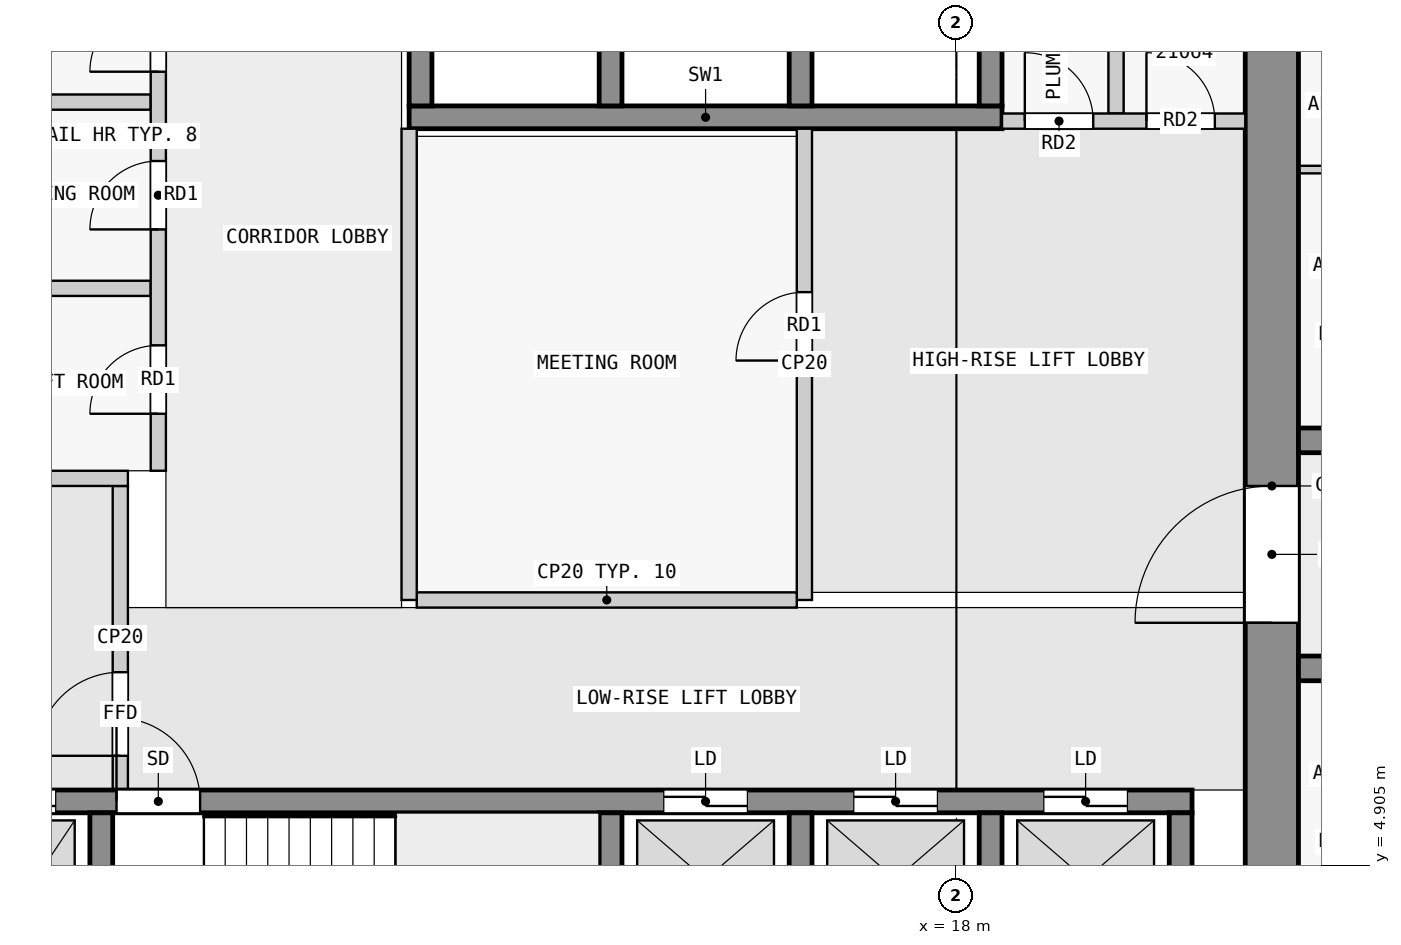
"""IFC4 building model, lengths in metres.
Left out: names, types, materials, properties, quantities, classifications, styles, units other than length and angle.
Written with IfcOpenShell. Run it as: python <this file> out.ifc"""

import sys

from ifc_helpers import new_model, si_unit, direction, frame, frame_2d, origin, place, context, subcontext, project, spatial, rectangle, extrude, element, fill, save


model = new_model("IFC4")
c1 = context("Model", 3, precision=1e-05, world=origin(), true_north=direction((0.0, 1.0)))
c2 = subcontext(c1, "Body", "Model", "MODEL_VIEW")
j1 = project(units=[si_unit("LENGTHUNIT", "METRE"), si_unit("PLANEANGLEUNIT", "RADIAN")], contexts=[c1])
p1 = place(None, origin())
s1 = spatial("IfcSite", under=j1, at=p1, CompositionType="ELEMENT")
p2 = place(p1, origin())
s2 = spatial("IfcBuilding", under=s1, at=p2, CompositionType="ELEMENT")
p3 = place(p2, frame((0.0, 0.0, 85.3)))
s3 = spatial("IfcBuildingStorey", under=s2, at=p3, CompositionType="ELEMENT", Elevation=85.3)
p4 = place(p3, frame((22.15, 2.5, 0.0), z_axis=(0.0, 0.0, 1.0), x_axis=(0.0, 1.0, 0.0)))
e1 = element("IfcWall", 1, at=p4, inside=s3, PredefinedType="SHEAR", context=c2, shape_type="SweptSolid", body=[
    extrude(rectangle(XDim=14.8, YDim=0.7, at=frame_2d((7.4, 0.0))), origin(), (0.0, 0.0, 1.0), 3.25),
])
p5 = place(p4, frame((5.6, 0.0, 0.0)))
e2 = element("IfcOpeningElement", 2, at=p5, cuts=e1, PredefinedType="OPENING", context=c2, shape_type="SweptSolid", body=[
    extrude(rectangle(XDim=1.8, YDim=2.1, at=frame_2d((0.9, 1.05))), frame((0.0, 0.36, 0.0), z_axis=(0.0, -1.0, 0.0), x_axis=(1.0, 0.0, 0.0)), (0.0, 0.0, 1.0), 0.72),
])
for number, where, z_axis, x_axis in (
    (3, (6.75, 2.8, 0.0), (0.0, 0.0, 1.0), (0.0, 1.0, 0.0)),
    (4, (13.45, 2.8, 0.0), (0.0, 0.0, 1.0), (0.0, 1.0, 0.0)),
    (5, (15.95, 2.8, 0.0), (0.0, 0.0, 1.0), (0.0, 1.0, 0.0)),
    (6, (18.45, 2.8, 0.0), (0.0, 0.0, 1.0), (0.0, 1.0, 0.0)),
    (7, (20.95, 2.8, 0.0), (0.0, 0.0, 1.0), (0.0, 1.0, 0.0)),
):
    element("IfcWall", number, at=place(p3, frame(where, z_axis=z_axis, x_axis=x_axis)), inside=s3, PredefinedType="SHEAR", context=c2, shape_type="SweptSolid", body=[
        extrude(rectangle(XDim=2.8, YDim=0.3, at=frame_2d((1.4, 0.0))), origin(), (0.0, 0.0, 1.0), 3.25),
    ])
p6 = place(p3, frame((2.3, 5.75, 0.0), z_axis=(0.0, 0.0, 1.0), x_axis=(1.0, 0.0, 0.0)))
e8 = element("IfcWall", 8, at=p6, inside=s3, PredefinedType="SHEAR", context=c2, shape_type="SweptSolid", body=[
    extrude(rectangle(XDim=18.8, YDim=0.3, at=frame_2d((9.4, 0.0))), origin(), (0.0, 0.0, 1.0), 3.25),
])
p7 = place(p6, frame((4.65, 0.0, 0.0)))
e9 = element("IfcOpeningElement", 9, at=p7, cuts=e8, PredefinedType="OPENING", context=c2, shape_type="SweptSolid", body=[
    extrude(rectangle(XDim=1.1, YDim=2.1, at=frame_2d((0.55, 1.05))), frame((0.0, 0.16, 0.0), z_axis=(0.0, -1.0, 0.0), x_axis=(1.0, 0.0, 0.0)), (0.0, 0.0, 1.0), 0.32),
])
p8 = place(p6, frame((0.45, 0.0, 0.0)))
e10 = element("IfcOpeningElement", 10, at=p8, cuts=e8, PredefinedType="OPENING", context=c2, shape_type="SweptSolid", body=[
    extrude(rectangle(XDim=1.1, YDim=2.1, at=frame_2d((0.55, 1.05))), frame((0.0, 0.16, 0.0), z_axis=(0.0, -1.0, 0.0), x_axis=(1.0, 0.0, 0.0)), (0.0, 0.0, 1.0), 0.32),
])
p9 = place(p6, frame((2.75, 0.0, 0.0)))
e11 = element("IfcOpeningElement", 11, at=p9, cuts=e8, PredefinedType="OPENING", context=c2, shape_type="SweptSolid", body=[
    extrude(rectangle(XDim=1.1, YDim=2.1, at=frame_2d((0.55, 1.05))), frame((0.0, 0.16, 0.0), z_axis=(0.0, -1.0, 0.0), x_axis=(1.0, 0.0, 0.0)), (0.0, 0.0, 1.0), 0.32),
])
p10 = place(p6, frame((11.85, 0.0, 0.0)))
e12 = element("IfcOpeningElement", 12, at=p10, cuts=e8, PredefinedType="OPENING", context=c2, shape_type="SweptSolid", body=[
    extrude(rectangle(XDim=1.1, YDim=2.1, at=frame_2d((0.55, 1.05))), frame((0.0, 0.16, 0.0), z_axis=(0.0, -1.0, 0.0), x_axis=(1.0, 0.0, 0.0)), (0.0, 0.0, 1.0), 0.32),
])
p11 = place(p6, frame((14.35, 0.0, 0.0)))
e13 = element("IfcOpeningElement", 13, at=p11, cuts=e8, PredefinedType="OPENING", context=c2, shape_type="SweptSolid", body=[
    extrude(rectangle(XDim=1.1, YDim=2.1, at=frame_2d((0.55, 1.05))), frame((0.0, 0.16, 0.0), z_axis=(0.0, -1.0, 0.0), x_axis=(1.0, 0.0, 0.0)), (0.0, 0.0, 1.0), 0.32),
])
p12 = place(p6, frame((16.85, 0.0, 0.0)))
e14 = element("IfcOpeningElement", 14, at=p12, cuts=e8, PredefinedType="OPENING", context=c2, shape_type="SweptSolid", body=[
    extrude(rectangle(XDim=1.1, YDim=2.1, at=frame_2d((0.55, 1.05))), frame((0.0, 0.16, 0.0), z_axis=(0.0, -1.0, 0.0), x_axis=(1.0, 0.0, 0.0)), (0.0, 0.0, 1.0), 0.32),
])
p13 = place(p3, frame((10.8, 14.75, 0.0), z_axis=(0.0, 0.0, 1.0), x_axis=(1.0, 0.0, 0.0)))
e15 = element("IfcWall", 15, at=p13, inside=s3, PredefinedType="SHEAR", context=c2, shape_type="SweptSolid", body=[
    extrude(rectangle(XDim=7.8, YDim=0.3, at=frame_2d((3.9, 0.0))), origin(), (0.0, 0.0, 1.0), 3.25),
])
for number, where, z_axis, x_axis in (
    (16, (10.95, 14.9, 0.0), (0.0, 0.0, 1.0), (0.0, 1.0, 0.0)),
    (17, (13.45, 14.9, 0.0), (0.0, 0.0, 1.0), (0.0, 1.0, 0.0)),
    (18, (15.95, 14.9, 0.0), (0.0, 0.0, 1.0), (0.0, 1.0, 0.0)),
    (19, (18.45, 14.9, 0.0), (0.0, 0.0, 1.0), (0.0, 1.0, 0.0)),
):
    element("IfcWall", number, at=place(p3, frame(where, z_axis=z_axis, x_axis=x_axis)), inside=s3, PredefinedType="SHEAR", context=c2, shape_type="SweptSolid", body=[
        extrude(rectangle(XDim=2.0, YDim=0.3, at=frame_2d((1.0, 0.0))), origin(), (0.0, 0.0, 1.0), 3.25),
    ])
p14 = place(p3, frame((22.5, 7.5, 0.0), z_axis=(0.0, 0.0, 1.0), x_axis=(1.0, 0.0, 0.0)))
e20 = element("IfcWall", 20, at=p14, inside=s3, PredefinedType="SHEAR", context=c2, shape_type="SweptSolid", body=[
    extrude(rectangle(XDim=22.5, YDim=0.325, at=frame_2d((11.25, 0.0))), origin(), (0.0, 0.0, 1.0), 3.25),
])
p15 = place(p14, frame((4.05, 0.0, 0.0)))
e21 = element("IfcOpeningElement", 21, at=p15, cuts=e20, PredefinedType="OPENING", context=c2, shape_type="SweptSolid", body=[
    extrude(rectangle(XDim=1.0, YDim=2.1, at=frame_2d((0.5, 1.05))), frame((0.0, 0.172, 0.0), z_axis=(0.0, -1.0, 0.0), x_axis=(1.0, 0.0, 0.0)), (0.0, 0.0, 1.0), 0.345),
])
p16 = place(p14, frame((13.05, 0.0, 0.0)))
e22 = element("IfcOpeningElement", 22, at=p16, cuts=e20, PredefinedType="OPENING", context=c2, shape_type="SweptSolid", body=[
    extrude(rectangle(XDim=1.0, YDim=2.1, at=frame_2d((0.5, 1.05))), frame((0.0, 0.172, 0.0), z_axis=(0.0, -1.0, 0.0), x_axis=(1.0, 0.0, 0.0)), (0.0, 0.0, 1.0), 0.345),
])
p17 = place(p14, frame((18.75, 0.0, 0.0)))
e23 = element("IfcOpeningElement", 23, at=p17, cuts=e20, PredefinedType="OPENING", context=c2, shape_type="SweptSolid", body=[
    extrude(rectangle(XDim=0.9, YDim=2.1, at=frame_2d((0.45, 1.05))), frame((0.0, 0.172, 0.0), z_axis=(0.0, -1.0, 0.0), x_axis=(1.0, 0.0, 0.0)), (0.0, 0.0, 1.0), 0.345),
])
p18 = place(p14, frame((20.95, 0.0, 0.0)))
e24 = element("IfcOpeningElement", 24, at=p18, cuts=e20, PredefinedType="OPENING", context=c2, shape_type="SweptSolid", body=[
    extrude(rectangle(XDim=1.0, YDim=2.1, at=frame_2d((0.5, 1.05))), frame((0.0, 0.172, 0.0), z_axis=(0.0, -1.0, 0.0), x_axis=(1.0, 0.0, 0.0)), (0.0, 0.0, 1.0), 0.345),
])
p19 = place(p3, frame((22.5, 10.5, 0.0), z_axis=(0.0, 0.0, 1.0), x_axis=(1.0, 0.0, 0.0)))
e25 = element("IfcWall", 25, at=p19, inside=s3, PredefinedType="SHEAR", context=c2, shape_type="SweptSolid", body=[
    extrude(rectangle(XDim=22.5, YDim=0.325, at=frame_2d((11.25, 0.0))), origin(), (0.0, 0.0, 1.0), 3.25),
])
p20 = place(p19, frame((4.05, 0.0, 0.0)))
e26 = element("IfcOpeningElement", 26, at=p20, cuts=e25, PredefinedType="OPENING", context=c2, shape_type="SweptSolid", body=[
    extrude(rectangle(XDim=1.0, YDim=2.1, at=frame_2d((0.5, 1.05))), frame((0.0, 0.172, 0.0), z_axis=(0.0, -1.0, 0.0), x_axis=(1.0, 0.0, 0.0)), (0.0, 0.0, 1.0), 0.345),
])
p21 = place(p19, frame((10.75, 0.0, 0.0)))
e27 = element("IfcOpeningElement", 27, at=p21, cuts=e25, PredefinedType="OPENING", context=c2, shape_type="SweptSolid", body=[
    extrude(rectangle(XDim=1.0, YDim=2.1, at=frame_2d((0.5, 1.05))), frame((0.0, 0.172, 0.0), z_axis=(0.0, -1.0, 0.0), x_axis=(1.0, 0.0, 0.0)), (0.0, 0.0, 1.0), 0.345),
])
p22 = place(p19, frame((16.85, 0.0, 0.0)))
e28 = element("IfcOpeningElement", 28, at=p22, cuts=e25, PredefinedType="OPENING", context=c2, shape_type="SweptSolid", body=[
    extrude(rectangle(XDim=1.0, YDim=2.1, at=frame_2d((0.5, 1.05))), frame((0.0, 0.172, 0.0), z_axis=(0.0, -1.0, 0.0), x_axis=(1.0, 0.0, 0.0)), (0.0, 0.0, 1.0), 0.345),
])
p23 = place(p3, frame((7.0, 5.9, 0.0), z_axis=(0.0, 0.0, 1.0), x_axis=(0.0, 1.0, 0.0)))
e29 = element("IfcWall", 29, at=p23, inside=s3, PredefinedType="PARTITIONING", context=c2, shape_type="SweptSolid", body=[
    extrude(rectangle(XDim=4.0, YDim=0.2, at=frame_2d((2.0, 0.0))), origin(), (0.0, 0.0, 1.0), 3.25),
])
p24 = place(p23, frame((0.45, 0.0, 0.0)))
e30 = element("IfcOpeningElement", 30, at=p24, cuts=e29, PredefinedType="OPENING", context=c2, shape_type="SweptSolid", body=[
    extrude(rectangle(XDim=1.1, YDim=2.1, at=frame_2d((0.55, 1.05))), frame((0.0, 0.11, 0.0), z_axis=(0.0, -1.0, 0.0), x_axis=(1.0, 0.0, 0.0)), (0.0, 0.0, 1.0), 0.22),
])
p25 = place(p3, frame((5.15, 10.0, 0.0), z_axis=(0.0, 0.0, 1.0), x_axis=(1.0, 0.0, 0.0)))
e31 = element("IfcWall", 31, at=p25, inside=s3, PredefinedType="PARTITIONING", context=c2, shape_type="SweptSolid", body=[
    extrude(rectangle(XDim=1.95, YDim=0.2, at=frame_2d((0.975, 0.0))), origin(), (0.0, 0.0, 1.0), 3.25),
])
p26 = place(p3, frame((10.8, 8.4, 0.0), z_axis=(0.0, 0.0, 1.0), x_axis=(0.0, 1.0, 0.0)))
e32 = element("IfcWall", 32, at=p26, inside=s3, PredefinedType="PARTITIONING", context=c2, shape_type="SweptSolid", body=[
    extrude(rectangle(XDim=6.2, YDim=0.2, at=frame_2d((3.1, 0.0))), origin(), (0.0, 0.0, 1.0), 3.25),
])
p27 = place(p3, frame((10.9, 8.4, 0.0), z_axis=(0.0, 0.0, 1.0), x_axis=(1.0, 0.0, 0.0)))
e33 = element("IfcWall", 33, at=p27, inside=s3, PredefinedType="PARTITIONING", context=c2, shape_type="SweptSolid", body=[
    extrude(rectangle(XDim=5.0, YDim=0.2, at=frame_2d((2.5, 0.0))), origin(), (0.0, 0.0, 1.0), 3.25),
])
p28 = place(p3, frame((16.0, 8.4, 0.0), z_axis=(0.0, 0.0, 1.0), x_axis=(0.0, 1.0, 0.0)))
e34 = element("IfcWall", 34, at=p28, inside=s3, PredefinedType="PARTITIONING", context=c2, shape_type="SweptSolid", body=[
    extrude(rectangle(XDim=6.2, YDim=0.2, at=frame_2d((3.1, 0.0))), origin(), (0.0, 0.0, 1.0), 3.25),
])
p29 = place(p28, frame((3.15, 0.0, 0.0)))
e35 = element("IfcOpeningElement", 35, at=p29, cuts=e34, PredefinedType="OPENING", context=c2, shape_type="SweptSolid", body=[
    extrude(rectangle(XDim=0.9, YDim=2.1, at=frame_2d((0.45, 1.05))), frame((0.0, 0.11, 0.0), z_axis=(0.0, -1.0, 0.0), x_axis=(1.0, 0.0, 0.0)), (0.0, 0.0, 1.0), 0.22),
])
p30 = place(p3, frame((7.5, 10.1, 0.0), z_axis=(0.0, 0.0, 1.0), x_axis=(0.0, 1.0, 0.0)))
e36 = element("IfcWall", 36, at=p30, inside=s3, PredefinedType="PARTITIONING", context=c2, shape_type="SweptSolid", body=[
    extrude(rectangle(XDim=7.2, YDim=0.2, at=frame_2d((3.6, 0.0))), origin(), (0.0, 0.0, 1.0), 3.25),
])
p31 = place(p30, frame((0.75, 0.0, 0.0)))
e37 = element("IfcOpeningElement", 37, at=p31, cuts=e36, PredefinedType="OPENING", context=c2, shape_type="SweptSolid", body=[
    extrude(rectangle(XDim=0.9, YDim=2.1, at=frame_2d((0.45, 1.05))), frame((0.0, 0.11, 0.0), z_axis=(0.0, -1.0, 0.0), x_axis=(1.0, 0.0, 0.0)), (0.0, 0.0, 1.0), 0.22),
])
p32 = place(p30, frame((3.175, 0.0, 0.0)))
e38 = element("IfcOpeningElement", 38, at=p32, cuts=e36, PredefinedType="OPENING", context=c2, shape_type="SweptSolid", body=[
    extrude(rectangle(XDim=0.9, YDim=2.1, at=frame_2d((0.45, 1.05))), frame((0.0, 0.11, 0.0), z_axis=(0.0, -1.0, 0.0), x_axis=(1.0, 0.0, 0.0)), (0.0, 0.0, 1.0), 0.22),
])
p33 = place(p30, frame((5.25, 0.0, 0.0)))
e39 = element("IfcOpeningElement", 39, at=p33, cuts=e36, PredefinedType="OPENING", context=c2, shape_type="SweptSolid", body=[
    extrude(rectangle(XDim=0.9, YDim=2.1, at=frame_2d((0.45, 1.05))), frame((0.0, 0.11, 0.0), z_axis=(0.0, -1.0, 0.0), x_axis=(1.0, 0.0, 0.0)), (0.0, 0.0, 1.0), 0.22),
])
for number, where, z_axis, x_axis in (
    (40, (5.15, 12.5, 0.0), (0.0, 0.0, 1.0), (1.0, 0.0, 0.0)),
    (41, (5.15, 14.95, 0.0), (0.0, 0.0, 1.0), (1.0, 0.0, 0.0)),
):
    element("IfcWall", number, at=place(p3, frame(where, z_axis=z_axis, x_axis=x_axis)), inside=s3, PredefinedType="PARTITIONING", context=c2, shape_type="SweptSolid", body=[
        extrude(rectangle(XDim=2.25, YDim=0.2, at=frame_2d((1.125, 0.0))), origin(), (0.0, 0.0, 1.0), 3.25),
    ])
p34 = place(p3, frame((18.6, 14.7, 0.0), z_axis=(0.0, 0.0, 1.0), x_axis=(1.0, 0.0, 0.0)))
e42 = element("IfcWall", 42, at=p34, inside=s3, PredefinedType="PARTITIONING", context=c2, shape_type="SweptSolid", body=[
    extrude(rectangle(XDim=3.2, YDim=0.2, at=frame_2d((1.6, 0.0))), origin(), (0.0, 0.0, 1.0), 3.25),
])
p35 = place(p34, frame((0.3, 0.0, 0.0)))
e43 = element("IfcOpeningElement", 43, at=p35, cuts=e42, PredefinedType="OPENING", context=c2, shape_type="SweptSolid", body=[
    extrude(rectangle(XDim=0.9, YDim=2.1, at=frame_2d((0.45, 1.05))), frame((0.0, 0.11, 0.0), z_axis=(0.0, -1.0, 0.0), x_axis=(1.0, 0.0, 0.0)), (0.0, 0.0, 1.0), 0.22),
])
p36 = place(p34, frame((1.9, 0.0, 0.0)))
e44 = element("IfcOpeningElement", 44, at=p36, cuts=e42, PredefinedType="OPENING", context=c2, shape_type="SweptSolid", body=[
    extrude(rectangle(XDim=0.9, YDim=2.1, at=frame_2d((0.45, 1.05))), frame((0.0, 0.11, 0.0), z_axis=(0.0, -1.0, 0.0), x_axis=(1.0, 0.0, 0.0)), (0.0, 0.0, 1.0), 0.22),
])
p37 = place(p3, frame((20.1, 14.8, 0.0), z_axis=(0.0, 0.0, 1.0), x_axis=(0.0, 1.0, 0.0)))
e45 = element("IfcWall", 45, at=p37, inside=s3, PredefinedType="PARTITIONING", context=c2, shape_type="SweptSolid", body=[
    extrude(rectangle(XDim=2.5, YDim=0.2, at=frame_2d((1.25, 0.0))), origin(), (0.0, 0.0, 1.0), 3.25),
])
p38 = place(p3, frame((24.25, 14.062, 0.0), z_axis=(0.0, 0.0, 1.0), x_axis=(-1.0, 0.0, 0.0)))
e46 = element("IfcWall", 46, at=p38, inside=s3, PredefinedType="PARTITIONING", context=c2, shape_type="SweptSolid", body=[
    extrude(rectangle(XDim=1.75, YDim=0.1, at=frame_2d((0.875, 0.0))), origin(), (0.0, 0.0, 1.0), 3.25),
])
p39 = place(p24, origin())
e47 = element("IfcDoor", 47, at=p39, inside=s3, OperationType="SINGLE_SWING_LEFT", PredefinedType="DOOR", context=c2, shape_type="SweptSolid", body=[
    extrude(rectangle(XDim=1.1, YDim=2.1, at=frame_2d((0.55, 1.05))), frame((0.0, 0.025, 0.0), z_axis=(0.0, -1.0, 0.0), x_axis=(1.0, 0.0, 0.0)), (0.0, 0.0, 1.0), 0.05),
])
fill(e30, e47)
p40 = place(p29, origin())
e48 = element("IfcDoor", 48, at=p40, inside=s3, OperationType="SINGLE_SWING_LEFT", PredefinedType="DOOR", context=c2, shape_type="SweptSolid", body=[
    extrude(rectangle(XDim=0.9, YDim=2.1, at=frame_2d((0.45, 1.05))), frame((0.0, 0.025, 0.0), z_axis=(0.0, -1.0, 0.0), x_axis=(1.0, 0.0, 0.0)), (0.0, 0.0, 1.0), 0.05),
])
fill(e35, e48)
p41 = place(p7, origin())
e49 = element("IfcDoor", 49, at=p41, inside=s3, OperationType="SINGLE_SWING_LEFT", PredefinedType="DOOR", context=c2, shape_type="SweptSolid", body=[
    extrude(rectangle(XDim=1.1, YDim=2.1, at=frame_2d((0.55, 1.05))), frame((0.0, 0.025, 0.0), z_axis=(0.0, -1.0, 0.0), x_axis=(1.0, 0.0, 0.0)), (0.0, 0.0, 1.0), 0.05),
])
fill(e9, e49)
p42 = place(p9, origin())
e50 = element("IfcDoor", 50, at=p42, inside=s3, OperationType="DOUBLE_DOOR_SLIDING", PredefinedType="DOOR", context=c2, shape_type="SweptSolid", body=[
    extrude(rectangle(XDim=1.1, YDim=2.1, at=frame_2d((0.55, 1.05))), frame((0.0, 0.025, 0.0), z_axis=(0.0, -1.0, 0.0), x_axis=(1.0, 0.0, 0.0)), (0.0, 0.0, 1.0), 0.05),
])
fill(e11, e50)
p43 = place(p10, origin())
e51 = element("IfcDoor", 51, at=p43, inside=s3, OperationType="DOUBLE_DOOR_SLIDING", PredefinedType="DOOR", context=c2, shape_type="SweptSolid", body=[
    extrude(rectangle(XDim=1.1, YDim=2.1, at=frame_2d((0.55, 1.05))), frame((0.0, 0.025, 0.0), z_axis=(0.0, -1.0, 0.0), x_axis=(1.0, 0.0, 0.0)), (0.0, 0.0, 1.0), 0.05),
])
fill(e12, e51)
p44 = place(p11, origin())
e52 = element("IfcDoor", 52, at=p44, inside=s3, OperationType="DOUBLE_DOOR_SLIDING", PredefinedType="DOOR", context=c2, shape_type="SweptSolid", body=[
    extrude(rectangle(XDim=1.1, YDim=2.1, at=frame_2d((0.55, 1.05))), frame((0.0, 0.025, 0.0), z_axis=(0.0, -1.0, 0.0), x_axis=(1.0, 0.0, 0.0)), (0.0, 0.0, 1.0), 0.05),
])
fill(e13, e52)
p45 = place(p12, origin())
e53 = element("IfcDoor", 53, at=p45, inside=s3, OperationType="DOUBLE_DOOR_SLIDING", PredefinedType="DOOR", context=c2, shape_type="SweptSolid", body=[
    extrude(rectangle(XDim=1.1, YDim=2.1, at=frame_2d((0.55, 1.05))), frame((0.0, 0.025, 0.0), z_axis=(0.0, -1.0, 0.0), x_axis=(1.0, 0.0, 0.0)), (0.0, 0.0, 1.0), 0.05),
])
fill(e14, e53)
p46 = place(p5, origin())
e54 = element("IfcDoor", 54, at=p46, inside=s3, OperationType="DOUBLE_DOOR_SINGLE_SWING", PredefinedType="DOOR", context=c2, shape_type="SweptSolid", body=[
    extrude(rectangle(XDim=1.8, YDim=2.1, at=frame_2d((0.9, 1.05))), frame((0.0, 0.025, 0.0), z_axis=(0.0, -1.0, 0.0), x_axis=(1.0, 0.0, 0.0)), (0.0, 0.0, 1.0), 0.05),
])
fill(e2, e54)
p47 = place(p31, origin())
e55 = element("IfcDoor", 55, at=p47, inside=s3, OperationType="SINGLE_SWING_RIGHT", PredefinedType="DOOR", context=c2, shape_type="SweptSolid", body=[
    extrude(rectangle(XDim=0.9, YDim=2.1, at=frame_2d((0.45, 1.05))), frame((0.0, 0.025, 0.0), z_axis=(0.0, -1.0, 0.0), x_axis=(1.0, 0.0, 0.0)), (0.0, 0.0, 1.0), 0.05),
])
fill(e37, e55)
p48 = place(p32, origin())
e56 = element("IfcDoor", 56, at=p48, inside=s3, OperationType="SINGLE_SWING_RIGHT", PredefinedType="DOOR", context=c2, shape_type="SweptSolid", body=[
    extrude(rectangle(XDim=0.9, YDim=2.1, at=frame_2d((0.45, 1.05))), frame((0.0, 0.025, 0.0), z_axis=(0.0, -1.0, 0.0), x_axis=(1.0, 0.0, 0.0)), (0.0, 0.0, 1.0), 0.05),
])
fill(e38, e56)
p49 = place(p33, origin())
e57 = element("IfcDoor", 57, at=p49, inside=s3, OperationType="SINGLE_SWING_RIGHT", PredefinedType="DOOR", context=c2, shape_type="SweptSolid", body=[
    extrude(rectangle(XDim=0.9, YDim=2.1, at=frame_2d((0.45, 1.05))), frame((0.0, 0.025, 0.0), z_axis=(0.0, -1.0, 0.0), x_axis=(1.0, 0.0, 0.0)), (0.0, 0.0, 1.0), 0.05),
])
fill(e39, e57)
p50 = place(p35, origin())
e58 = element("IfcDoor", 58, at=p50, inside=s3, OperationType="SINGLE_SWING_LEFT", PredefinedType="DOOR", context=c2, shape_type="SweptSolid", body=[
    extrude(rectangle(XDim=0.9, YDim=2.1, at=frame_2d((0.45, 1.05))), frame((0.0, 0.025, 0.0), z_axis=(0.0, -1.0, 0.0), x_axis=(1.0, 0.0, 0.0)), (0.0, 0.0, 1.0), 0.05),
])
fill(e43, e58)
p51 = place(p36, origin())
e59 = element("IfcDoor", 59, at=p51, inside=s3, OperationType="SINGLE_SWING_LEFT", PredefinedType="DOOR", context=c2, shape_type="SweptSolid", body=[
    extrude(rectangle(XDim=0.9, YDim=2.1, at=frame_2d((0.45, 1.05))), frame((0.0, 0.025, 0.0), z_axis=(0.0, -1.0, 0.0), x_axis=(1.0, 0.0, 0.0)), (0.0, 0.0, 1.0), 0.05),
])
fill(e44, e59)
save(model, sys.argv[1])
